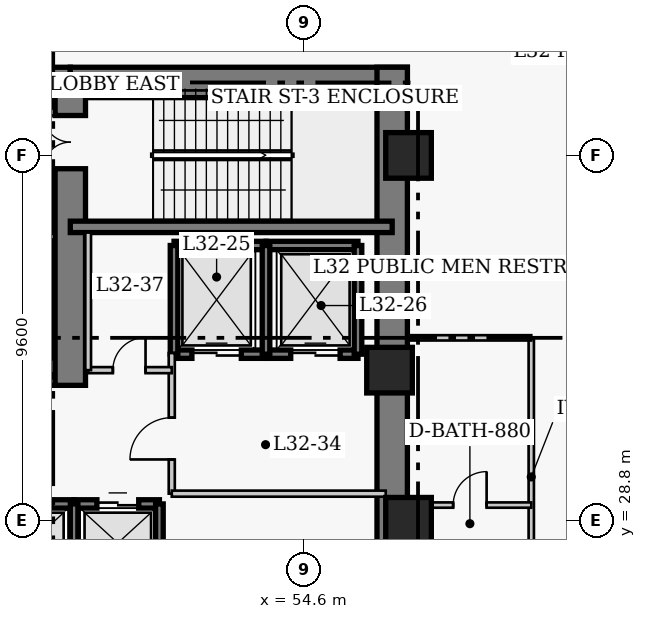
"""IFC4 building model, lengths in metres.
Left out: names, types, materials, properties, quantities, classifications, styles, units other than length and angle.
Written with IfcOpenShell. Run it as: python <this file> out.ifc"""

import sys

from ifc_helpers import new_model, si_unit, direction, frame, frame_2d, origin, origin_2d, place, context, subcontext, project, spatial, rectangle, extrude, element, fill, save


model = new_model("IFC4")
c1 = context("Model", 3, precision=1e-05, world=origin(), true_north=direction((0.0, 1.0)))
c2 = subcontext(c1, "Body", "Model", "MODEL_VIEW")
j1 = project(units=[si_unit("LENGTHUNIT", "METRE"), si_unit("PLANEANGLEUNIT", "RADIAN")], contexts=[c1])
p1 = place(None, origin())
s1 = spatial("IfcSite", under=j1, at=p1, CompositionType="ELEMENT")
p2 = place(p1, origin())
s2 = spatial("IfcBuilding", under=s1, at=p2, CompositionType="ELEMENT")
p3 = place(p2, frame((0.0, 0.0, 129.8)))
s3 = spatial("IfcBuildingStorey", under=s2, at=p3, CompositionType="ELEMENT", Elevation=129.8)
p4 = place(p3, frame((35.85, 40.32, 0.0), z_axis=(0.0, 0.0, 1.0), x_axis=(1.0, 0.0, 0.0)))
e1 = element("IfcWall", 1, at=p4, inside=s3, PredefinedType="SHEAR", context=c2, shape_type="SweptSolid", body=[
    extrude(rectangle(XDim=12.6, YDim=0.8, at=frame_2d((6.3, 0.0))), origin(), (0.0, 0.0, 1.0), 4.8),
])
p5 = place(p3, frame((48.45, 40.32, 0.0), z_axis=(0.0, 0.0, 1.0), x_axis=(1.0, 0.0, 0.0)))
e2 = element("IfcWall", 2, at=p5, inside=s3, PredefinedType="SHEAR", context=c2, shape_type="SweptSolid", body=[
    extrude(rectangle(XDim=8.87, YDim=0.8, at=frame_2d((4.435, 0.0))), origin(), (0.0, 0.0, 1.0), 4.8),
])
p6 = place(p3, frame((56.92, 27.05, 0.0), z_axis=(0.0, 0.0, 1.0), x_axis=(0.0, 1.0, 0.0)))
e3 = element("IfcWall", 3, at=p6, inside=s3, PredefinedType="SHEAR", context=c2, shape_type="SweptSolid", body=[
    extrude(rectangle(XDim=13.67, YDim=0.8, at=frame_2d((6.835, 0.0))), origin(), (0.0, 0.0, 1.0), 4.8),
])
p7 = place(p3, frame((45.81, 32.75, 0.0), z_axis=(0.0, 0.0, 1.0), x_axis=(1.0, 0.0, 0.0)))
e4 = element("IfcWall", 4, at=p7, inside=s3, PredefinedType="SHEAR", context=c2, shape_type="SweptSolid", body=[
    extrude(rectangle(XDim=2.64, YDim=0.8, at=frame_2d((1.32, 0.0))), origin(), (0.0, 0.0, 1.0), 4.8),
])
p8 = place(p3, frame((48.45, 32.35, 0.0), z_axis=(0.0, 0.0, 1.0), x_axis=(0.0, 1.0, 0.0)))
e5 = element("IfcWall", 5, at=p8, inside=s3, PredefinedType="SHEAR", context=c2, shape_type="SweptSolid", body=[
    extrude(rectangle(XDim=7.97, YDim=0.8, at=frame_2d((3.985, 0.0))), origin(), (0.0, 0.0, 1.0), 4.8),
])
p9 = place(p8, frame((5.7, 0.0, 0.0)))
e6 = element("IfcOpeningElement", 6, at=p9, cuts=e5, PredefinedType="OPENING", context=c2, shape_type="SweptSolid", body=[
    extrude(rectangle(XDim=1.4, YDim=2.15, at=frame_2d((0.7, 1.075))), frame((0.0, 0.41, 0.0), z_axis=(0.0, -1.0, 0.0), x_axis=(1.0, 0.0, 0.0)), (0.0, 0.0, 1.0), 0.82),
])
p10 = place(p3, frame((48.45, 36.52, 0.0), z_axis=(0.0, 0.0, 1.0), x_axis=(1.0, 0.0, 0.0)))
e7 = element("IfcWall", 7, at=p10, inside=s3, PredefinedType="SHEAR", context=c2, shape_type="SweptSolid", body=[
    extrude(rectangle(XDim=8.47, YDim=0.3, at=frame_2d((4.235, 0.0))), origin(), (0.0, 0.0, 1.0), 4.8),
])
for number, where, z_axis, x_axis in (
    (8, (57.35, 28.8, 0.0), (0.0, 0.0, 1.0), (1.0, 0.0, 0.0)),
    (9, (57.35, 38.4, 0.0), (0.0, 0.0, 1.0), (1.0, 0.0, 0.0)),
    (10, (56.85, 32.75, 0.0), (0.0, 0.0, 1.0), (1.0, 0.0, 0.0)),
):
    element("IfcColumn", number, at=place(p3, frame(where, z_axis=z_axis, x_axis=x_axis)), inside=s3, PredefinedType="COLUMN", context=c2, shape_type="SweptSolid", body=[
        extrude(rectangle(XDim=1.2, YDim=1.2, at=origin_2d()), origin(), (0.0, 0.0, 1.0), 4.8),
    ])
p11 = place(p3, frame((46.25, 29.23, 0.0), z_axis=(0.0, 0.0, 1.0), x_axis=(1.0, 0.0, 0.0)))
e11 = element("IfcWall", 11, at=p11, inside=s3, PredefinedType="SHEAR", context=c2, shape_type="SweptSolid", body=[
    extrude(rectangle(XDim=2.3, YDim=0.22, at=frame_2d((1.15, 0.0))), origin(), (0.0, 0.0, 1.0), 4.8),
])
p12 = place(p11, frame((0.6, 0.0, 0.0)))
e12 = element("IfcOpeningElement", 12, at=p12, cuts=e11, PredefinedType="OPENING", context=c2, shape_type="SweptSolid", body=[
    extrude(rectangle(XDim=1.1, YDim=2.15, at=frame_2d((0.55, 1.075))), frame((0.0, 0.12, 0.0), z_axis=(0.0, -1.0, 0.0), x_axis=(1.0, 0.0, 0.0)), (0.0, 0.0, 1.0), 0.24),
])
p13 = place(p3, frame((48.55, 29.23, 0.0), z_axis=(0.0, 0.0, 1.0), x_axis=(1.0, 0.0, 0.0)))
e13 = element("IfcWall", 13, at=p13, inside=s3, PredefinedType="SHEAR", context=c2, shape_type="SweptSolid", body=[
    extrude(rectangle(XDim=2.245, YDim=0.22, at=frame_2d((1.123, 0.0))), origin(), (0.0, 0.0, 1.0), 4.8),
])
p14 = place(p13, frame((0.6, 0.0, 0.0)))
e14 = element("IfcOpeningElement", 14, at=p14, cuts=e13, PredefinedType="OPENING", context=c2, shape_type="SweptSolid", body=[
    extrude(rectangle(XDim=1.1, YDim=2.15, at=frame_2d((0.55, 1.075))), frame((0.0, 0.12, 0.0), z_axis=(0.0, -1.0, 0.0), x_axis=(1.0, 0.0, 0.0)), (0.0, 0.0, 1.0), 0.24),
])
for number, where, z_axis, x_axis in (
    (15, (48.55, 27.17, 0.0), (0.0, 0.0, 1.0), (0.0, 1.0, 0.0)),
    (16, (50.795, 27.17, 0.0), (0.0, 0.0, 1.0), (0.0, 1.0, 0.0)),
):
    element("IfcWall", number, at=place(p3, frame(where, z_axis=z_axis, x_axis=x_axis)), inside=s3, PredefinedType="SHEAR", context=c2, shape_type="SweptSolid", body=[
        extrude(rectangle(XDim=2.06, YDim=0.2, at=frame_2d((1.03, 0.0))), origin(), (0.0, 0.0, 1.0), 4.8),
    ])
p15 = place(p3, frame((51.18, 36.03, 0.0), z_axis=(0.0, 0.0, 1.0), x_axis=(1.0, 0.0, 0.0)))
e17 = element("IfcWall", 17, at=p15, inside=s3, PredefinedType="SHEAR", context=c2, shape_type="SweptSolid", body=[
    extrude(rectangle(XDim=2.42, YDim=0.22, at=frame_2d((1.21, 0.0))), origin(), (0.0, 0.0, 1.0), 4.8),
])
p16 = place(p3, frame((51.18, 33.17, 0.0), z_axis=(0.0, 0.0, 1.0), x_axis=(1.0, 0.0, 0.0)))
e18 = element("IfcWall", 18, at=p16, inside=s3, PredefinedType="SHEAR", context=c2, shape_type="SweptSolid", body=[
    extrude(rectangle(XDim=2.42, YDim=0.22, at=frame_2d((1.21, 0.0))), origin(), (0.0, 0.0, 1.0), 4.8),
])
p17 = place(p16, frame((0.47, 0.0, 0.0)))
e19 = element("IfcOpeningElement", 19, at=p17, cuts=e18, PredefinedType="OPENING", context=c2, shape_type="SweptSolid", body=[
    extrude(rectangle(XDim=1.3, YDim=2.15, at=frame_2d((0.65, 1.075))), frame((0.0, 0.12, 0.0), z_axis=(0.0, -1.0, 0.0), x_axis=(1.0, 0.0, 0.0)), (0.0, 0.0, 1.0), 0.24),
])
p18 = place(p3, frame((51.18, 33.17, 0.0), z_axis=(0.0, 0.0, 1.0), x_axis=(0.0, 1.0, 0.0)))
e20 = element("IfcWall", 20, at=p18, inside=s3, PredefinedType="SHEAR", context=c2, shape_type="SweptSolid", body=[
    extrude(rectangle(XDim=2.86, YDim=0.2, at=frame_2d((1.43, 0.0))), origin(), (0.0, 0.0, 1.0), 4.8),
])
p19 = place(p3, frame((53.6, 36.03, 0.0), z_axis=(0.0, 0.0, 1.0), x_axis=(1.0, 0.0, 0.0)))
e21 = element("IfcWall", 21, at=p19, inside=s3, PredefinedType="SHEAR", context=c2, shape_type="SweptSolid", body=[
    extrude(rectangle(XDim=2.42, YDim=0.22, at=frame_2d((1.21, 0.0))), origin(), (0.0, 0.0, 1.0), 4.8),
])
p20 = place(p3, frame((53.6, 33.17, 0.0), z_axis=(0.0, 0.0, 1.0), x_axis=(1.0, 0.0, 0.0)))
e22 = element("IfcWall", 22, at=p20, inside=s3, PredefinedType="SHEAR", context=c2, shape_type="SweptSolid", body=[
    extrude(rectangle(XDim=2.42, YDim=0.22, at=frame_2d((1.21, 0.0))), origin(), (0.0, 0.0, 1.0), 4.8),
])
p21 = place(p20, frame((0.65, 0.0, 0.0)))
e23 = element("IfcOpeningElement", 23, at=p21, cuts=e22, PredefinedType="OPENING", context=c2, shape_type="SweptSolid", body=[
    extrude(rectangle(XDim=1.3, YDim=2.15, at=frame_2d((0.65, 1.075))), frame((0.0, 0.12, 0.0), z_axis=(0.0, -1.0, 0.0), x_axis=(1.0, 0.0, 0.0)), (0.0, 0.0, 1.0), 0.24),
])
for number, where, z_axis, x_axis in (
    (24, (53.6, 33.17, 0.0), (0.0, 0.0, 1.0), (0.0, 1.0, 0.0)),
    (25, (56.02, 33.17, 0.0), (0.0, 0.0, 1.0), (0.0, 1.0, 0.0)),
):
    element("IfcWall", number, at=place(p3, frame(where, z_axis=z_axis, x_axis=x_axis)), inside=s3, PredefinedType="SHEAR", context=c2, shape_type="SweptSolid", body=[
        extrude(rectangle(XDim=2.86, YDim=0.2, at=frame_2d((1.43, 0.0))), origin(), (0.0, 0.0, 1.0), 4.8),
    ])
p22 = place(p3, frame((47.895, 33.245, 0.0), z_axis=(0.0, 0.0, 1.0), x_axis=(0.0, 1.0, 0.0)))
e26 = element("IfcWall", 26, at=p22, inside=s3, PredefinedType="SHEAR", context=c2, shape_type="SweptSolid", body=[
    extrude(rectangle(XDim=2.91, YDim=0.2, at=frame_2d((1.455, 0.0))), origin(), (0.0, 0.0, 1.0), 4.8),
])
p23 = place(p3, frame((51.12, 29.5, 0.0), z_axis=(0.0, 0.0, 1.0), x_axis=(0.0, 1.0, 0.0)))
e27 = element("IfcWall", 27, at=p23, inside=s3, PredefinedType="PARTITIONING", context=c2, shape_type="SweptSolid", body=[
    extrude(rectangle(XDim=3.7, YDim=0.16, at=frame_2d((1.85, 0.0))), origin(), (0.0, 0.0, 1.0), 4.55),
])
p24 = place(p23, frame((0.9, 0.0, 0.0)))
e28 = element("IfcOpeningElement", 28, at=p24, cuts=e27, PredefinedType="OPENING", context=c2, shape_type="SweptSolid", body=[
    extrude(rectangle(XDim=1.1, YDim=2.15, at=frame_2d((0.55, 1.075))), frame((0.0, 0.09, 0.0), z_axis=(0.0, -1.0, 0.0), x_axis=(1.0, 0.0, 0.0)), (0.0, 0.0, 1.0), 0.18),
])
p25 = place(p3, frame((51.12, 29.5, 0.0), z_axis=(0.0, 0.0, 1.0), x_axis=(1.0, 0.0, 0.0)))
e29 = element("IfcWall", 29, at=p25, inside=s3, PredefinedType="PARTITIONING", context=c2, shape_type="SweptSolid", body=[
    extrude(rectangle(XDim=5.63, YDim=0.16, at=frame_2d((2.815, 0.0))), origin(), (0.0, 0.0, 1.0), 4.55),
])
p26 = place(p3, frame((48.92, 32.75, 0.0), z_axis=(0.0, 0.0, 1.0), x_axis=(1.0, 0.0, 0.0)))
e30 = element("IfcWall", 30, at=p26, inside=s3, PredefinedType="PARTITIONING", context=c2, shape_type="SweptSolid", body=[
    extrude(rectangle(XDim=2.2, YDim=0.16, at=frame_2d((1.1, 0.0))), origin(), (0.0, 0.0, 1.0), 4.55),
])
p27 = place(p26, frame((0.65, 0.0, 0.0)))
e31 = element("IfcOpeningElement", 31, at=p27, cuts=e30, PredefinedType="OPENING", context=c2, shape_type="SweptSolid", body=[
    extrude(rectangle(XDim=0.86, YDim=2.05, at=frame_2d((0.43, 1.025))), frame((0.0, 0.09, 0.0), z_axis=(0.0, -1.0, 0.0), x_axis=(1.0, 0.0, 0.0)), (0.0, 0.0, 1.0), 0.18),
])
p28 = place(p3, frame((48.92, 32.75, 0.0), z_axis=(0.0, 0.0, 1.0), x_axis=(0.0, 1.0, 0.0)))
e32 = element("IfcWall", 32, at=p28, inside=s3, PredefinedType="PARTITIONING", context=c2, shape_type="SweptSolid", body=[
    extrude(rectangle(XDim=3.62, YDim=0.15, at=frame_2d((1.81, 0.0))), origin(), (0.0, 0.0, 1.0), 4.55),
])
p29 = place(p3, frame((60.58, 26.28, 0.0), z_axis=(0.0, 0.0, 1.0), x_axis=(0.0, 1.0, 0.0)))
e33 = element("IfcWall", 33, at=p29, inside=s3, PredefinedType="PLUMBINGWALL", context=c2, shape_type="SweptSolid", body=[
    extrude(rectangle(XDim=7.32, YDim=0.14, at=frame_2d((3.66, 0.0))), origin(), (0.0, 0.0, 1.0), 4.55),
])
p30 = place(p3, frame((57.35, 29.2, 0.0), z_axis=(0.0, 0.0, 1.0), x_axis=(1.0, 0.0, 0.0)))
e34 = element("IfcWall", 34, at=p30, inside=s3, PredefinedType="PLUMBINGWALL", context=c2, shape_type="SweptSolid", body=[
    extrude(rectangle(XDim=3.23, YDim=0.14, at=frame_2d((1.615, 0.0))), origin(), (0.0, 0.0, 1.0), 4.55),
])
p31 = place(p30, frame((1.175, 0.0, 0.0)))
e35 = element("IfcOpeningElement", 35, at=p31, cuts=e34, PredefinedType="OPENING", context=c2, shape_type="SweptSolid", body=[
    extrude(rectangle(XDim=0.88, YDim=2.05, at=frame_2d((0.44, 1.025))), frame((0.0, 0.08, 0.0), z_axis=(0.0, -1.0, 0.0), x_axis=(1.0, 0.0, 0.0)), (0.0, 0.0, 1.0), 0.16),
])
p32 = place(p3, frame((57.35, 33.6, 0.0), z_axis=(0.0, 0.0, 1.0), x_axis=(1.0, 0.0, 0.0)))
e36 = element("IfcWall", 36, at=p32, inside=s3, PredefinedType="PLUMBINGWALL", context=c2, shape_type="SweptSolid", body=[
    extrude(rectangle(XDim=3.23, YDim=0.14, at=frame_2d((1.615, 0.0))), origin(), (0.0, 0.0, 1.0), 4.55),
])
p33 = place(p14, origin())
e37 = element("IfcDoor", 37, at=p33, inside=s3, OperationType="DOUBLE_DOOR_SLIDING", PredefinedType="DOOR", context=c2, shape_type="SweptSolid", body=[
    extrude(rectangle(XDim=1.1, YDim=2.15, at=frame_2d((0.55, 1.075))), frame((0.0, 0.025, 0.0), z_axis=(0.0, -1.0, 0.0), x_axis=(1.0, 0.0, 0.0)), (0.0, 0.0, 1.0), 0.05),
])
fill(e14, e37)
p34 = place(p17, origin())
e38 = element("IfcDoor", 38, at=p34, inside=s3, OperationType="DOUBLE_DOOR_SLIDING", PredefinedType="DOOR", context=c2, shape_type="SweptSolid", body=[
    extrude(rectangle(XDim=1.3, YDim=2.15, at=frame_2d((0.65, 1.075))), frame((0.0, 0.025, 0.0), z_axis=(0.0, -1.0, 0.0), x_axis=(1.0, 0.0, 0.0)), (0.0, 0.0, 1.0), 0.05),
])
fill(e19, e38)
p35 = place(p21, origin())
e39 = element("IfcDoor", 39, at=p35, inside=s3, OperationType="DOUBLE_DOOR_SLIDING", PredefinedType="DOOR", context=c2, shape_type="SweptSolid", body=[
    extrude(rectangle(XDim=1.3, YDim=2.15, at=frame_2d((0.65, 1.075))), frame((0.0, 0.025, 0.0), z_axis=(0.0, -1.0, 0.0), x_axis=(1.0, 0.0, 0.0)), (0.0, 0.0, 1.0), 0.05),
])
fill(e23, e39)
p36 = place(p24, origin())
e40 = element("IfcDoor", 40, at=p36, inside=s3, OperationType="SINGLE_SWING_LEFT", PredefinedType="DOOR", context=c2, shape_type="SweptSolid", body=[
    extrude(rectangle(XDim=1.1, YDim=2.15, at=frame_2d((0.55, 1.075))), frame((0.0, 0.025, 0.0), z_axis=(0.0, -1.0, 0.0), x_axis=(1.0, 0.0, 0.0)), (0.0, 0.0, 1.0), 0.05),
])
fill(e28, e40)
p37 = place(p27, origin())
e41 = element("IfcDoor", 41, at=p37, inside=s3, OperationType="SINGLE_SWING_RIGHT", PredefinedType="DOOR", context=c2, shape_type="SweptSolid", body=[
    extrude(rectangle(XDim=0.86, YDim=2.05, at=frame_2d((0.43, 1.025))), frame((0.0, 0.025, 0.0), z_axis=(0.0, -1.0, 0.0), x_axis=(1.0, 0.0, 0.0)), (0.0, 0.0, 1.0), 0.05),
])
fill(e31, e41)
p38 = place(p31, origin())
e42 = element("IfcDoor", 42, at=p38, inside=s3, OperationType="SINGLE_SWING_RIGHT", PredefinedType="DOOR", context=c2, shape_type="SweptSolid", body=[
    extrude(rectangle(XDim=0.88, YDim=2.05, at=frame_2d((0.44, 1.025))), frame((0.0, 0.025, 0.0), z_axis=(0.0, -1.0, 0.0), x_axis=(1.0, 0.0, 0.0)), (0.0, 0.0, 1.0), 0.05),
])
fill(e35, e42)
p39 = place(p9, origin())
e43 = element("IfcDoor", 43, at=p39, inside=s3, OperationType="DOUBLE_DOOR_SINGLE_SWING", PredefinedType="DOOR", context=c2, shape_type="SweptSolid", body=[
    extrude(rectangle(XDim=1.4, YDim=2.15, at=frame_2d((0.7, 1.075))), frame((0.0, 0.025, 0.0), z_axis=(0.0, -1.0, 0.0), x_axis=(1.0, 0.0, 0.0)), (0.0, 0.0, 1.0), 0.05),
])
fill(e6, e43)
save(model, sys.argv[1])
